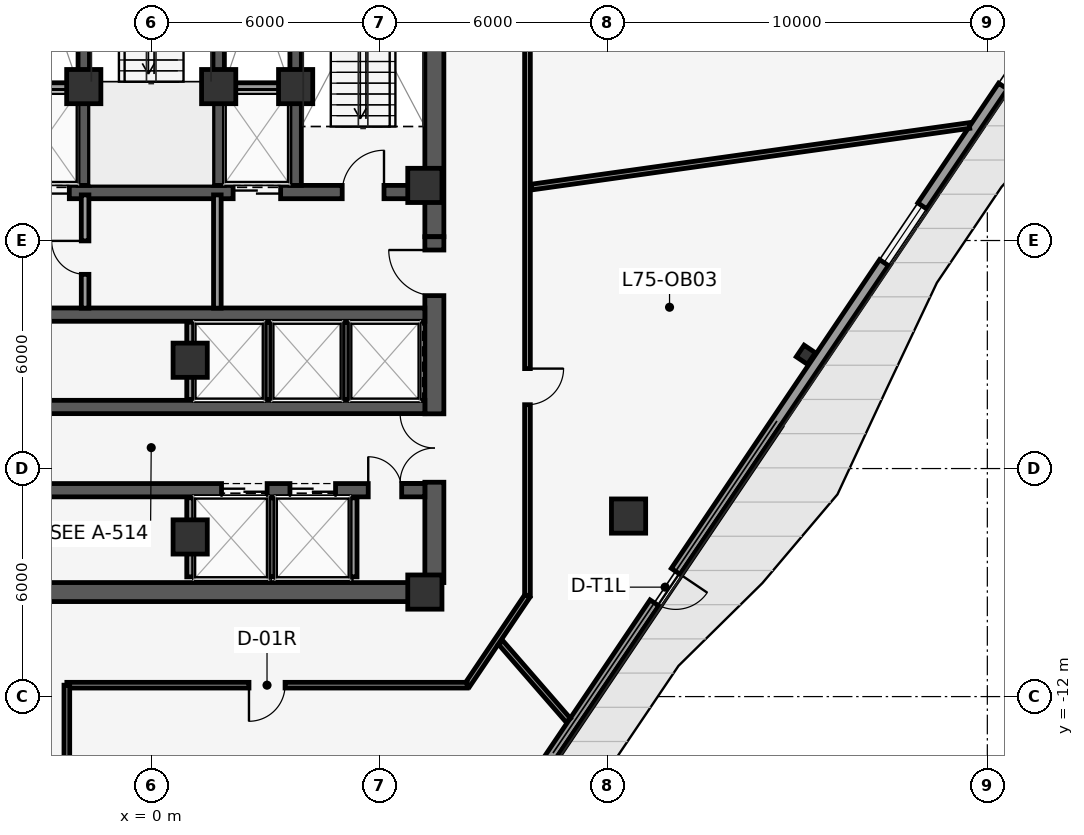
"""IFC4 building model, lengths in metres.
Left out: names, types, materials, properties, quantities, classifications, styles, units other than length and angle.
Written with IfcOpenShell. Run it as: python <this file> out.ifc"""

import sys

from ifc_helpers import new_model, si_unit, direction, frame, frame_2d, origin, origin_2d, place, context, subcontext, project, spatial, rectangle, i_section, extrude, element, fill, save


model = new_model("IFC4")
c1 = context("Model", 3, precision=1e-05, world=origin(), true_north=direction((0.0, 1.0)))
c2 = subcontext(c1, "Body", "Model", "MODEL_VIEW")
j1 = project(units=[si_unit("LENGTHUNIT", "METRE"), si_unit("PLANEANGLEUNIT", "RADIAN")], contexts=[c1])
p1 = place(None, origin())
s1 = spatial("IfcSite", under=j1, at=p1, CompositionType="ELEMENT")
p2 = place(p1, origin())
s2 = spatial("IfcBuilding", under=s1, at=p2, CompositionType="ELEMENT")
p3 = place(p2, frame((0.0, 0.0, 318.8)))
s3 = spatial("IfcBuildingStorey", under=s2, at=p3, CompositionType="ELEMENT", Elevation=318.8)
p4 = place(p3, frame((-7.2, 1.275, 0.0), z_axis=(0.0, 0.0, 1.0), x_axis=(1.0, 0.0, 0.0)))
e1 = element("IfcWall", 1, at=p4, inside=s3, PredefinedType="SHEAR", context=c2, shape_type="SweptSolid", body=[
    extrude(rectangle(XDim=14.4, YDim=0.35, at=frame_2d((7.2, 0.0))), origin(), (0.0, 0.0, 1.0), 4.32),
])
p5 = place(p4, frame((3.795, 0.0, 0.0)))
e2 = element("IfcOpeningElement", 2, at=p5, cuts=e1, PredefinedType="OPENING", context=c2, shape_type="SweptSolid", body=[
    extrude(rectangle(XDim=1.25, YDim=2.25, at=frame_2d((0.625, 1.125))), frame((0.0, 0.185, 0.0), z_axis=(0.0, -1.0, 0.0), x_axis=(1.0, 0.0, 0.0)), (0.0, 0.0, 1.0), 0.37),
])
p6 = place(p4, frame((9.355, 0.0, 0.0)))
e3 = element("IfcOpeningElement", 3, at=p6, cuts=e1, PredefinedType="OPENING", context=c2, shape_type="SweptSolid", body=[
    extrude(rectangle(XDim=1.25, YDim=2.25, at=frame_2d((0.625, 1.125))), frame((0.0, 0.185, 0.0), z_axis=(0.0, -1.0, 0.0), x_axis=(1.0, 0.0, 0.0)), (0.0, 0.0, 1.0), 0.37),
])
p7 = place(p4, frame((1.075, 0.0, 0.0)))
e4 = element("IfcOpeningElement", 4, at=p7, cuts=e1, PredefinedType="OPENING", context=c2, shape_type="SweptSolid", body=[
    extrude(rectangle(XDim=1.1, YDim=2.15, at=frame_2d((0.55, 1.075))), frame((0.0, 0.185, 0.0), z_axis=(0.0, -1.0, 0.0), x_axis=(1.0, 0.0, 0.0)), (0.0, 0.0, 1.0), 0.37),
])
p8 = place(p4, frame((12.225, 0.0, 0.0)))
e5 = element("IfcOpeningElement", 5, at=p8, cuts=e1, PredefinedType="OPENING", context=c2, shape_type="SweptSolid", body=[
    extrude(rectangle(XDim=1.1, YDim=2.15, at=frame_2d((0.55, 1.075))), frame((0.0, 0.185, 0.0), z_axis=(0.0, -1.0, 0.0), x_axis=(1.0, 0.0, 0.0)), (0.0, 0.0, 1.0), 0.37),
])
for number, where, z_axis, x_axis in (
    (6, (-1.775, 1.45, 0.0), (0.0, 0.0, 1.0), (0.0, 1.0, 0.0)),
    (7, (1.775, 1.45, 0.0), (0.0, 0.0, 1.0), (0.0, 1.0, 0.0)),
    (8, (3.8, 1.45, 0.0), (0.0, 0.0, 1.0), (0.0, 1.0, 0.0)),
):
    element("IfcWall", number, at=place(p3, frame(where, z_axis=z_axis, x_axis=x_axis)), inside=s3, PredefinedType="SHEAR", context=c2, shape_type="SweptSolid", body=[
        extrude(rectangle(XDim=7.7, YDim=0.3, at=frame_2d((3.85, 0.0))), origin(), (0.0, 0.0, 1.0), 4.32),
    ])
p9 = place(p3, frame((7.45, 0.1, 0.0), z_axis=(0.0, 0.0, 1.0), x_axis=(0.0, 1.0, 0.0)))
e9 = element("IfcWall", 9, at=p9, inside=s3, PredefinedType="SHEAR", context=c2, shape_type="SweptSolid", body=[
    extrude(rectangle(XDim=9.05, YDim=0.5, at=frame_2d((4.525, 0.0))), origin(), (0.0, 0.0, 1.0), 4.32),
])
p10 = place(p3, frame((7.45, -9.0, 0.0), z_axis=(0.0, 0.0, 1.0), x_axis=(0.0, 1.0, 0.0)))
e10 = element("IfcWall", 10, at=p10, inside=s3, PredefinedType="SHEAR", context=c2, shape_type="SweptSolid", body=[
    extrude(rectangle(XDim=9.1, YDim=0.5, at=frame_2d((4.55, 0.0))), origin(), (0.0, 0.0, 1.0), 4.32),
])
p11 = place(p10, frame((2.64, 0.0, 0.0)))
e11 = element("IfcOpeningElement", 11, at=p11, cuts=e10, PredefinedType="OPENING", context=c2, shape_type="SweptSolid", body=[
    extrude(rectangle(XDim=1.8, YDim=2.2, at=frame_2d((0.9, 1.1))), frame((0.0, 0.26, 0.0), z_axis=(0.0, -1.0, 0.0), x_axis=(1.0, 0.0, 0.0)), (0.0, 0.0, 1.0), 0.52),
])
p12 = place(p10, frame((7.55, 0.0, 0.0)))
e12 = element("IfcOpeningElement", 12, at=p12, cuts=e10, PredefinedType="OPENING", context=c2, shape_type="SweptSolid", body=[
    extrude(rectangle(XDim=1.2, YDim=2.15, at=frame_2d((0.6, 1.075))), frame((0.0, 0.26, 0.0), z_axis=(0.0, -1.0, 0.0), x_axis=(1.0, 0.0, 0.0)), (0.0, 0.0, 1.0), 0.52),
])
p13 = place(p3, frame((-7.45, -9.25, 0.0), z_axis=(0.0, 0.0, 1.0), x_axis=(1.0, 0.0, 0.0)))
e13 = element("IfcWall", 13, at=p13, inside=s3, PredefinedType="SHEAR", context=c2, shape_type="SweptSolid", body=[
    extrude(rectangle(XDim=14.9, YDim=0.5, at=frame_2d((7.45, 0.0))), origin(), (0.0, 0.0, 1.0), 4.32),
])
p14 = place(p3, frame((-7.2, -1.95, 0.0), z_axis=(0.0, 0.0, 1.0), x_axis=(1.0, 0.0, 0.0)))
e14 = element("IfcWall", 14, at=p14, inside=s3, PredefinedType="SHEAR", context=c2, shape_type="SweptSolid", body=[
    extrude(rectangle(XDim=14.4, YDim=0.35, at=frame_2d((7.2, 0.0))), origin(), (0.0, 0.0, 1.0), 4.32),
])
p15 = place(p3, frame((-7.2, -4.38, 0.0), z_axis=(0.0, 0.0, 1.0), x_axis=(1.0, 0.0, 0.0)))
e15 = element("IfcWall", 15, at=p15, inside=s3, PredefinedType="SHEAR", context=c2, shape_type="SweptSolid", body=[
    extrude(rectangle(XDim=14.4, YDim=0.35, at=frame_2d((7.2, 0.0))), origin(), (0.0, 0.0, 1.0), 4.32),
])
p16 = place(p15, frame((2.125, 0.0, 0.0)))
e16 = element("IfcOpeningElement", 16, at=p16, cuts=e15, PredefinedType="OPENING", context=c2, shape_type="SweptSolid", body=[
    extrude(rectangle(XDim=0.95, YDim=2.15, at=frame_2d((0.475, 1.075))), frame((0.0, 0.185, 0.0), z_axis=(0.0, -1.0, 0.0), x_axis=(1.0, 0.0, 0.0)), (0.0, 0.0, 1.0), 0.37),
])
p17 = place(p3, frame((-7.2, -6.57, 0.0), z_axis=(0.0, 0.0, 1.0), x_axis=(1.0, 0.0, 0.0)))
e17 = element("IfcWall", 17, at=p17, inside=s3, PredefinedType="SHEAR", context=c2, shape_type="SweptSolid", body=[
    extrude(rectangle(XDim=14.4, YDim=0.35, at=frame_2d((7.2, 0.0))), origin(), (0.0, 0.0, 1.0), 4.32),
])
p18 = place(p17, frame((9.05, 0.0, 0.0)))
e18 = element("IfcOpeningElement", 18, at=p18, cuts=e17, PredefinedType="OPENING", context=c2, shape_type="SweptSolid", body=[
    extrude(rectangle(XDim=1.2, YDim=2.25, at=frame_2d((0.6, 1.125))), frame((0.0, 0.185, 0.0), z_axis=(0.0, -1.0, 0.0), x_axis=(1.0, 0.0, 0.0)), (0.0, 0.0, 1.0), 0.37),
])
p19 = place(p17, frame((10.85, 0.0, 0.0)))
e19 = element("IfcOpeningElement", 19, at=p19, cuts=e17, PredefinedType="OPENING", context=c2, shape_type="SweptSolid", body=[
    extrude(rectangle(XDim=1.2, YDim=2.25, at=frame_2d((0.6, 1.125))), frame((0.0, 0.185, 0.0), z_axis=(0.0, -1.0, 0.0), x_axis=(1.0, 0.0, 0.0)), (0.0, 0.0, 1.0), 0.37),
])
p20 = place(p17, frame((2.125, 0.0, 0.0)))
e20 = element("IfcOpeningElement", 20, at=p20, cuts=e17, PredefinedType="OPENING", context=c2, shape_type="SweptSolid", body=[
    extrude(rectangle(XDim=0.95, YDim=2.15, at=frame_2d((0.475, 1.075))), frame((0.0, 0.185, 0.0), z_axis=(0.0, -1.0, 0.0), x_axis=(1.0, 0.0, 0.0)), (0.0, 0.0, 1.0), 0.37),
])
p21 = place(p17, frame((12.91, 0.0, 0.0)))
e21 = element("IfcOpeningElement", 21, at=p21, cuts=e17, PredefinedType="OPENING", context=c2, shape_type="SweptSolid", body=[
    extrude(rectangle(XDim=0.88, YDim=2.15, at=frame_2d((0.44, 1.075))), frame((0.0, 0.185, 0.0), z_axis=(0.0, -1.0, 0.0), x_axis=(1.0, 0.0, 0.0)), (0.0, 0.0, 1.0), 0.37),
])
for number, where, z_axis, x_axis in (
    (22, (7.2, -9.25, 0.0), (0.0, 0.0, 1.0), (1.0, 0.0, 0.0)),
    (23, (7.2, 1.45, 0.0), (0.0, 0.0, 1.0), (1.0, 0.0, 0.0)),
    (24, (3.8, 4.05, 0.0), (0.0, 0.0, 1.0), (1.0, 0.0, 0.0)),
    (25, (-1.775, 4.05, 0.0), (0.0, 0.0, 1.0), (1.0, 0.0, 0.0)),
    (26, (1.775, 4.05, 0.0), (0.0, 0.0, 1.0), (1.0, 0.0, 0.0)),
    (27, (1.025, -3.15, 0.0), (0.0, 0.0, 1.0), (1.0, 0.0, 0.0)),
    (28, (1.025, -7.8, 0.0), (0.0, 0.0, 1.0), (1.0, 0.0, 0.0)),
    (29, (12.56, -7.25, 0.0), (0.0, 0.0, 1.0), (1.0, 0.0, 0.0)),
):
    element("IfcColumn", number, at=place(p3, frame(where, z_axis=z_axis, x_axis=x_axis)), inside=s3, PredefinedType="COLUMN", context=c2, shape_type="SweptSolid", body=[
        extrude(rectangle(XDim=0.9, YDim=0.9, at=origin_2d()), origin(), (0.0, 0.0, 1.0), 4.6),
    ])
p22 = place(p3, frame((17.224, -3.006, 0.0), z_axis=(0.0, 0.0, 1.0), x_axis=(0.559192903471, 0.829037572555, 0.0)))
e30 = element("IfcColumn", 30, at=p22, inside=s3, PredefinedType="COLUMN", context=c2, shape_type="SweptSolid", body=[
    extrude(i_section(OverallWidth=0.368, OverallDepth=0.356, WebThickness=0.011, FlangeThickness=0.018, at=origin_2d()), origin(), (0.0, 0.0, 1.0), 4.6),
])
p23 = place(p3, frame((25.8, 9.083, 0.0), z_axis=(0.0, 0.0, 1.0), x_axis=(-0.55919392155, -0.829036885851, 0.0)))
e31 = element("IfcWall", 31, at=p23, inside=s3, PredefinedType="STANDARD", context=c2, shape_type="SweptSolid", body=[
    extrude(rectangle(XDim=43.915, YDim=0.28, at=frame_2d((21.958, 0.0))), origin(), (0.0, 0.0, 1.0), 4.32),
])
p24 = place(p23, frame((21.457, 0.0, 0.0)))
e32 = element("IfcOpeningElement", 32, at=p24, cuts=e31, PredefinedType="OPENING", context=c2, shape_type="SweptSolid", body=[
    extrude(rectangle(XDim=1.0, YDim=2.15, at=frame_2d((0.5, 1.075))), frame((0.0, 0.15, 0.0), z_axis=(0.0, -1.0, 0.0), x_axis=(1.0, 0.0, 0.0)), (0.0, 0.0, 1.0), 0.3),
])
p25 = place(p23, frame((4.257, 0.0, 0.85)))
e33 = element("IfcOpeningElement", 33, at=p25, cuts=e31, PredefinedType="OPENING", context=c2, shape_type="SweptSolid", body=[
    extrude(rectangle(XDim=1.8, YDim=2.4, at=frame_2d((0.9, 1.2))), frame((0.0, 0.15, 0.0), z_axis=(0.0, -1.0, 0.0), x_axis=(1.0, 0.0, 0.0)), (0.0, 0.0, 1.0), 0.3),
])
p26 = place(p23, frame((9.857, 0.0, 0.85)))
e34 = element("IfcOpeningElement", 34, at=p26, cuts=e31, PredefinedType="OPENING", context=c2, shape_type="SweptSolid", body=[
    extrude(rectangle(XDim=1.8, YDim=2.4, at=frame_2d((0.9, 1.2))), frame((0.0, 0.15, 0.0), z_axis=(0.0, -1.0, 0.0), x_axis=(1.0, 0.0, 0.0)), (0.0, 0.0, 1.0), 0.3),
])
p27 = place(p23, frame((32.257, 0.0, 0.85)))
e35 = element("IfcOpeningElement", 35, at=p27, cuts=e31, PredefinedType="OPENING", context=c2, shape_type="SweptSolid", body=[
    extrude(rectangle(XDim=1.8, YDim=2.4, at=frame_2d((0.9, 1.2))), frame((0.0, 0.15, 0.0), z_axis=(0.0, -1.0, 0.0), x_axis=(1.0, 0.0, 0.0)), (0.0, 0.0, 1.0), 0.3),
])
p28 = place(p23, frame((37.857, 0.0, 0.85)))
e36 = element("IfcOpeningElement", 36, at=p28, cuts=e31, PredefinedType="OPENING", context=c2, shape_type="SweptSolid", body=[
    extrude(rectangle(XDim=1.8, YDim=2.4, at=frame_2d((0.9, 1.2))), frame((0.0, 0.15, 0.0), z_axis=(0.0, -1.0, 0.0), x_axis=(1.0, 0.0, 0.0)), (0.0, 0.0, 1.0), 0.3),
])
for number, where, z_axis, x_axis in (
    (37, (-3.65, 4.05, 0.0), (0.0, 0.0, 1.0), (1.0, 0.0, 0.0)),
    (38, (1.92, 4.05, 0.0), (0.0, 0.0, 1.0), (1.0, 0.0, 0.0)),
):
    element("IfcWall", number, at=place(p3, frame(where, z_axis=z_axis, x_axis=x_axis)), inside=s3, PredefinedType="PARTITIONING", context=c2, shape_type="SweptSolid", body=[
        extrude(rectangle(XDim=1.73, YDim=0.2, at=frame_2d((0.865, 0.0))), origin(), (0.0, 0.0, 1.0), 4.32),
    ])
p29 = place(p3, frame((1.025, -4.18, 0.0), z_axis=(0.0, 0.0, 1.0), x_axis=(0.0, 1.0, 0.0)))
e39 = element("IfcWall", 39, at=p29, inside=s3, PredefinedType="PARTITIONING", context=c2, shape_type="SweptSolid", body=[
    extrude(rectangle(XDim=2.03, YDim=0.18, at=frame_2d((1.015, 0.0))), origin(), (0.0, 0.0, 1.0), 3.368),
])
for number, where, z_axis, x_axis in (
    (40, (3.075, -4.18, 0.0), (0.0, 0.0, 1.0), (0.0, 1.0, 0.0)),
    (41, (5.125, -4.18, 0.0), (0.0, 0.0, 1.0), (0.0, 1.0, 0.0)),
):
    element("IfcWall", number, at=place(p3, frame(where, z_axis=z_axis, x_axis=x_axis)), inside=s3, PredefinedType="PARTITIONING", context=c2, shape_type="SweptSolid", body=[
        extrude(rectangle(XDim=2.03, YDim=0.15, at=frame_2d((1.015, 0.0))), origin(), (0.0, 0.0, 1.0), 4.32),
    ])
p30 = place(p3, frame((1.025, -8.85, 0.0), z_axis=(0.0, 0.0, 1.0), x_axis=(0.0, 1.0, 0.0)))
e42 = element("IfcWall", 42, at=p30, inside=s3, PredefinedType="PARTITIONING", context=c2, shape_type="SweptSolid", body=[
    extrude(rectangle(XDim=2.08, YDim=0.18, at=frame_2d((1.04, 0.0))), origin(), (0.0, 0.0, 1.0), 3.368),
])
p31 = place(p3, frame((3.175, -8.85, 0.0), z_axis=(0.0, 0.0, 1.0), x_axis=(0.0, 1.0, 0.0)))
e43 = element("IfcWall", 43, at=p31, inside=s3, PredefinedType="PARTITIONING", context=c2, shape_type="SweptSolid", body=[
    extrude(rectangle(XDim=2.08, YDim=0.15, at=frame_2d((1.04, 0.0))), origin(), (0.0, 0.0, 1.0), 4.32),
])
p32 = place(p3, frame((5.325, -8.85, 0.0), z_axis=(0.0, 0.0, 1.0), x_axis=(0.0, 1.0, 0.0)))
e44 = element("IfcWall", 44, at=p32, inside=s3, PredefinedType="PARTITIONING", context=c2, shape_type="SweptSolid", body=[
    extrude(rectangle(XDim=2.08, YDim=0.18, at=frame_2d((1.04, 0.0))), origin(), (0.0, 0.0, 1.0), 4.32),
])
p33 = place(p3, frame((-1.74, -1.78, 0.0), z_axis=(0.0, 0.0, 1.0), x_axis=(0.0, 1.0, 0.0)))
e45 = element("IfcWall", 45, at=p33, inside=s3, PredefinedType="PARTITIONING", context=c2, shape_type="SweptSolid", body=[
    extrude(rectangle(XDim=2.98, YDim=0.2, at=frame_2d((1.49, 0.0))), origin(), (0.0, 0.0, 1.0), 4.32),
])
p34 = place(p33, frame((0.89, 0.0, 0.0)))
e46 = element("IfcOpeningElement", 46, at=p34, cuts=e45, PredefinedType="OPENING", context=c2, shape_type="SweptSolid", body=[
    extrude(rectangle(XDim=0.88, YDim=2.15, at=frame_2d((0.44, 1.075))), frame((0.0, 0.11, 0.0), z_axis=(0.0, -1.0, 0.0), x_axis=(1.0, 0.0, 0.0)), (0.0, 0.0, 1.0), 0.22),
])
p35 = place(p3, frame((1.74, -1.78, 0.0), z_axis=(0.0, 0.0, 1.0), x_axis=(0.0, 1.0, 0.0)))
e47 = element("IfcWall", 47, at=p35, inside=s3, PredefinedType="PARTITIONING", context=c2, shape_type="SweptSolid", body=[
    extrude(rectangle(XDim=2.98, YDim=0.2, at=frame_2d((1.49, 0.0))), origin(), (0.0, 0.0, 1.0), 4.32),
])
p36 = place(p3, frame((9.9, 11.85, 0.0), z_axis=(0.0, 0.0, 1.0), x_axis=(0.0, -1.0, 0.0)))
e48 = element("IfcWall", 48, at=p36, inside=s3, PredefinedType="PARTITIONING", context=c2, shape_type="SweptSolid", body=[
    extrude(rectangle(XDim=21.198, YDim=0.15, at=frame_2d((10.599, 0.0))), origin(), (0.0, 0.0, 1.0), 4.32),
])
p37 = place(p36, frame((15.22, 0.0, 0.0)))
e49 = element("IfcOpeningElement", 49, at=p37, cuts=e48, PredefinedType="OPENING", context=c2, shape_type="SweptSolid", body=[
    extrude(rectangle(XDim=0.95, YDim=2.15, at=frame_2d((0.475, 1.075))), frame((0.0, 0.085, 0.0), z_axis=(0.0, -1.0, 0.0), x_axis=(1.0, 0.0, 0.0)), (0.0, 0.0, 1.0), 0.17),
])
p38 = place(p36, frame((4.875, 0.0, 0.0)))
e50 = element("IfcOpeningElement", 50, at=p38, cuts=e48, PredefinedType="OPENING", context=c2, shape_type="SweptSolid", body=[
    extrude(rectangle(XDim=0.95, YDim=2.15, at=frame_2d((0.475, 1.075))), frame((0.0, 0.085, 0.0), z_axis=(0.0, -1.0, 0.0), x_axis=(1.0, 0.0, 0.0)), (0.0, 0.0, 1.0), 0.17),
])
p39 = place(p3, frame((9.9, -9.348, 0.0), z_axis=(0.0, 0.0, 1.0), x_axis=(-0.559200828408, -0.829032227062, 0.0)))
e51 = element("IfcWall", 51, at=p39, inside=s3, PredefinedType="PARTITIONING", context=c2, shape_type="SweptSolid", body=[
    extrude(rectangle(XDim=2.836, YDim=0.15, at=frame_2d((1.418, 0.0))), origin(), (0.0, 0.0, 1.0), 4.32),
])
p40 = place(p3, frame((8.314, -11.7, 0.0), z_axis=(0.0, 0.0, 1.0), x_axis=(-1.0, 0.0, 0.0)))
e52 = element("IfcWall", 52, at=p40, inside=s3, PredefinedType="PARTITIONING", context=c2, shape_type="SweptSolid", body=[
    extrude(rectangle(XDim=10.534, YDim=0.15, at=frame_2d((5.267, 0.0))), origin(), (0.0, 0.0, 1.0), 4.32),
])
p41 = place(p40, frame((4.792, 0.0, 0.0)))
e53 = element("IfcOpeningElement", 53, at=p41, cuts=e52, PredefinedType="OPENING", context=c2, shape_type="SweptSolid", body=[
    extrude(rectangle(XDim=0.95, YDim=2.15, at=frame_2d((0.475, 1.075))), frame((0.0, 0.085, 0.0), z_axis=(0.0, -1.0, 0.0), x_axis=(1.0, 0.0, 0.0)), (0.0, 0.0, 1.0), 0.17),
])
p42 = place(p3, frame((-2.22, -11.7, 0.0), z_axis=(0.0, 0.0, 1.0), x_axis=(0.0, -1.0, 0.0)))
e54 = element("IfcWall", 54, at=p42, inside=s3, PredefinedType="PARTITIONING", context=c2, shape_type="SweptSolid", body=[
    extrude(rectangle(XDim=9.18, YDim=0.15, at=frame_2d((4.59, 0.0))), origin(), (0.0, 0.0, 1.0), 4.32),
])
p43 = place(p3, frame((9.196, -10.579, 0.0), z_axis=(0.0, 0.0, 1.0), x_axis=(0.656055910676, -0.754712290921, 0.0)))
e55 = element("IfcWall", 55, at=p43, inside=s3, PredefinedType="PARTITIONING", context=c2, shape_type="SweptSolid", body=[
    extrude(rectangle(XDim=2.707, YDim=0.15, at=frame_2d((1.354, 0.0))), origin(), (0.0, 0.0, 1.0), 4.32),
])
p44 = place(p3, frame((10.005, 1.406, 0.0), z_axis=(0.0, 0.0, 1.0), x_axis=(0.990267561789, 0.13917670807, 0.0)))
e56 = element("IfcWall", 56, at=p44, inside=s3, PredefinedType="PARTITIONING", context=c2, shape_type="SweptSolid", body=[
    extrude(rectangle(XDim=11.635, YDim=0.15, at=frame_2d((5.818, 0.0))), origin(), (0.0, 0.0, 1.0), 4.32),
])
p45 = place(p24, origin())
e57 = element("IfcDoor", 57, at=p45, inside=s3, OperationType="SINGLE_SWING_LEFT", PredefinedType="DOOR", context=c2, shape_type="SweptSolid", body=[
    extrude(rectangle(XDim=1.0, YDim=2.15, at=frame_2d((0.5, 1.075))), frame((0.0, 0.025, 0.0), z_axis=(0.0, -1.0, 0.0), x_axis=(1.0, 0.0, 0.0)), (0.0, 0.0, 1.0), 0.05),
])
fill(e32, e57)
p46 = place(p25, origin())
e58 = element("IfcWindow", 58, at=p46, inside=s3, PartitioningType="DOUBLE_PANEL_VERTICAL", PredefinedType="WINDOW", context=c2, shape_type="SweptSolid", body=[
    extrude(rectangle(XDim=1.8, YDim=2.4, at=frame_2d((0.9, 1.2))), frame((0.0, 0.03, 0.0), z_axis=(0.0, -1.0, 0.0), x_axis=(1.0, 0.0, 0.0)), (0.0, 0.0, 1.0), 0.06),
])
fill(e33, e58)
p47 = place(p26, origin())
e59 = element("IfcWindow", 59, at=p47, inside=s3, PartitioningType="DOUBLE_PANEL_VERTICAL", PredefinedType="WINDOW", context=c2, shape_type="SweptSolid", body=[
    extrude(rectangle(XDim=1.8, YDim=2.4, at=frame_2d((0.9, 1.2))), frame((0.0, 0.03, 0.0), z_axis=(0.0, -1.0, 0.0), x_axis=(1.0, 0.0, 0.0)), (0.0, 0.0, 1.0), 0.06),
])
fill(e34, e59)
p48 = place(p18, origin())
e60 = element("IfcDoor", 60, at=p48, inside=s3, OperationType="DOUBLE_DOOR_SLIDING", PredefinedType="DOOR", context=c2, shape_type="SweptSolid", body=[
    extrude(rectangle(XDim=1.2, YDim=2.25, at=frame_2d((0.6, 1.125))), frame((0.0, 0.025, 0.0), z_axis=(0.0, -1.0, 0.0), x_axis=(1.0, 0.0, 0.0)), (0.0, 0.0, 1.0), 0.05),
])
fill(e18, e60)
p49 = place(p19, origin())
e61 = element("IfcDoor", 61, at=p49, inside=s3, OperationType="DOUBLE_DOOR_SLIDING", PredefinedType="DOOR", context=c2, shape_type="SweptSolid", body=[
    extrude(rectangle(XDim=1.2, YDim=2.25, at=frame_2d((0.6, 1.125))), frame((0.0, 0.025, 0.0), z_axis=(0.0, -1.0, 0.0), x_axis=(1.0, 0.0, 0.0)), (0.0, 0.0, 1.0), 0.05),
])
fill(e19, e61)
p50 = place(p5, origin())
e62 = element("IfcDoor", 62, at=p50, inside=s3, OperationType="DOUBLE_DOOR_SLIDING", PredefinedType="DOOR", context=c2, shape_type="SweptSolid", body=[
    extrude(rectangle(XDim=1.25, YDim=2.25, at=frame_2d((0.625, 1.125))), frame((0.0, 0.025, 0.0), z_axis=(0.0, -1.0, 0.0), x_axis=(1.0, 0.0, 0.0)), (0.0, 0.0, 1.0), 0.05),
])
fill(e2, e62)
p51 = place(p6, origin())
e63 = element("IfcDoor", 63, at=p51, inside=s3, OperationType="DOUBLE_DOOR_SLIDING", PredefinedType="DOOR", context=c2, shape_type="SweptSolid", body=[
    extrude(rectangle(XDim=1.25, YDim=2.25, at=frame_2d((0.625, 1.125))), frame((0.0, 0.025, 0.0), z_axis=(0.0, -1.0, 0.0), x_axis=(1.0, 0.0, 0.0)), (0.0, 0.0, 1.0), 0.05),
])
fill(e3, e63)
p52 = place(p8, origin())
e64 = element("IfcDoor", 64, at=p52, inside=s3, OperationType="SINGLE_SWING_RIGHT", PredefinedType="DOOR", context=c2, shape_type="SweptSolid", body=[
    extrude(rectangle(XDim=1.1, YDim=2.15, at=frame_2d((0.55, 1.075))), frame((0.0, 0.025, 0.0), z_axis=(0.0, -1.0, 0.0), x_axis=(1.0, 0.0, 0.0)), (0.0, 0.0, 1.0), 0.05),
])
fill(e5, e64)
p53 = place(p11, origin())
e65 = element("IfcDoor", 65, at=p53, inside=s3, OperationType="DOUBLE_DOOR_SINGLE_SWING", PredefinedType="DOOR", context=c2, shape_type="SweptSolid", body=[
    extrude(rectangle(XDim=1.8, YDim=2.2, at=frame_2d((0.9, 1.1))), frame((0.0, 0.025, 0.0), z_axis=(0.0, -1.0, 0.0), x_axis=(1.0, 0.0, 0.0)), (0.0, 0.0, 1.0), 0.05),
])
fill(e11, e65)
p54 = place(p12, origin())
e66 = element("IfcDoor", 66, at=p54, inside=s3, OperationType="SINGLE_SWING_RIGHT", PredefinedType="DOOR", context=c2, shape_type="SweptSolid", body=[
    extrude(rectangle(XDim=1.2, YDim=2.15, at=frame_2d((0.6, 1.075))), frame((0.0, 0.025, 0.0), z_axis=(0.0, -1.0, 0.0), x_axis=(1.0, 0.0, 0.0)), (0.0, 0.0, 1.0), 0.05),
])
fill(e12, e66)
p55 = place(p21, origin())
e67 = element("IfcDoor", 67, at=p55, inside=s3, OperationType="SINGLE_SWING_LEFT", PredefinedType="DOOR", context=c2, shape_type="SweptSolid", body=[
    extrude(rectangle(XDim=0.88, YDim=2.15, at=frame_2d((0.44, 1.075))), frame((0.0, 0.025, 0.0), z_axis=(0.0, -1.0, 0.0), x_axis=(1.0, 0.0, 0.0)), (0.0, 0.0, 1.0), 0.05),
])
fill(e21, e67)
p56 = place(p34, origin())
e68 = element("IfcDoor", 68, at=p56, inside=s3, OperationType="SINGLE_SWING_RIGHT", PredefinedType="DOOR", context=c2, shape_type="SweptSolid", body=[
    extrude(rectangle(XDim=0.88, YDim=2.15, at=frame_2d((0.44, 1.075))), frame((0.0, 0.025, 0.0), z_axis=(0.0, -1.0, 0.0), x_axis=(1.0, 0.0, 0.0)), (0.0, 0.0, 1.0), 0.05),
])
fill(e46, e68)
p57 = place(p41, origin())
e69 = element("IfcDoor", 69, at=p57, inside=s3, OperationType="SINGLE_SWING_RIGHT", PredefinedType="DOOR", context=c2, shape_type="SweptSolid", body=[
    extrude(rectangle(XDim=0.95, YDim=2.15, at=frame_2d((0.475, 1.075))), frame((0.0, 0.025, 0.0), z_axis=(0.0, -1.0, 0.0), x_axis=(1.0, 0.0, 0.0)), (0.0, 0.0, 1.0), 0.05),
])
fill(e53, e69)
p58 = place(p37, origin())
e70 = element("IfcDoor", 70, at=p58, inside=s3, OperationType="SINGLE_SWING_LEFT", PredefinedType="DOOR", context=c2, shape_type="SweptSolid", body=[
    extrude(rectangle(XDim=0.95, YDim=2.15, at=frame_2d((0.475, 1.075))), frame((0.0, 0.025, 0.0), z_axis=(0.0, -1.0, 0.0), x_axis=(1.0, 0.0, 0.0)), (0.0, 0.0, 1.0), 0.05),
])
fill(e49, e70)
save(model, sys.argv[1])
